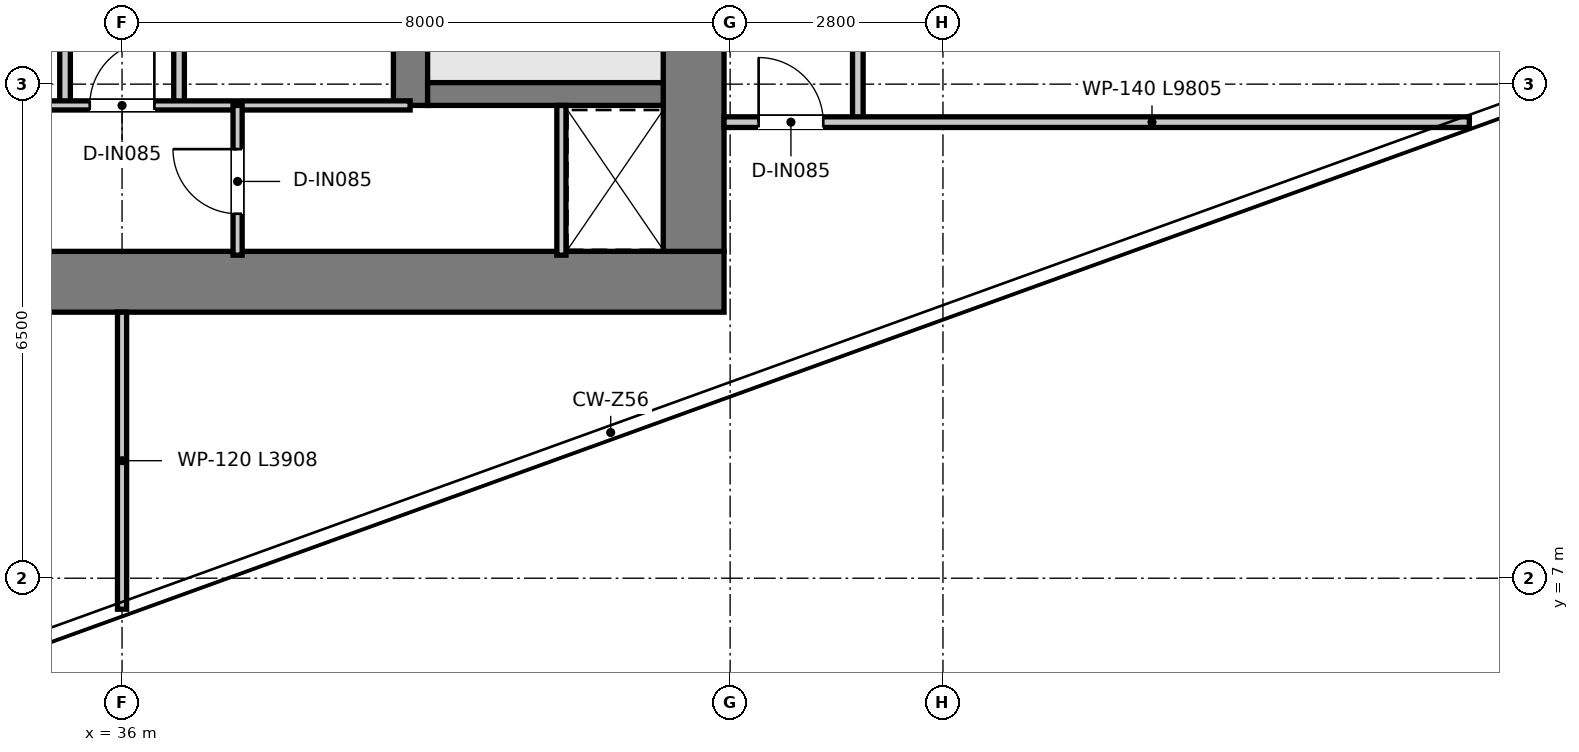
"""IFC4 building model, lengths in metres.
Left out: names, types, materials, properties, quantities, classifications, styles, units other than length and angle.
Written with IfcOpenShell. Run it as: python <this file> out.ifc"""

import sys

from ifc_helpers import new_model, si_unit, direction, frame, frame_2d, origin, place, context, subcontext, project, spatial, rectangle, extrude, element, fill, save


model = new_model("IFC4")
c1 = context("Model", 3, precision=1e-05, world=origin(), true_north=direction((0.0, 1.0)))
c2 = subcontext(c1, "Body", "Model", "MODEL_VIEW")
j1 = project(units=[si_unit("LENGTHUNIT", "METRE"), si_unit("PLANEANGLEUNIT", "RADIAN")], contexts=[c1])
p1 = place(None, origin())
s1 = spatial("IfcSite", under=j1, at=p1, CompositionType="ELEMENT")
p2 = place(p1, origin())
s2 = spatial("IfcBuilding", under=s1, at=p2, CompositionType="ELEMENT")
p3 = place(p2, frame((0.0, 0.0, 331.65)))
s3 = spatial("IfcBuildingStorey", under=s2, at=p3, CompositionType="ELEMENT", Elevation=331.65)
p4 = place(p3, frame((28.08, 10.9, 0.0), z_axis=(0.0, 0.0, 1.0), x_axis=(1.0, 0.0, 0.0)))
e1 = element("IfcWall", 1, at=p4, inside=s3, PredefinedType="SHEAR", context=c2, shape_type="SweptSolid", body=[
    extrude(rectangle(XDim=15.84, YDim=0.8, at=frame_2d((7.92, 0.0))), origin(), (0.0, 0.0, 1.0), 3.95),
])
p5 = place(p3, frame((43.52, 11.3, 0.0), z_axis=(0.0, 0.0, 1.0), x_axis=(0.0, 1.0, 0.0)))
e2 = element("IfcWall", 2, at=p5, inside=s3, PredefinedType="SHEAR", context=c2, shape_type="SweptSolid", body=[
    extrude(rectangle(XDim=14.7, YDim=0.8, at=frame_2d((7.35, 0.0))), origin(), (0.0, 0.0, 1.0), 3.95),
])
p6 = place(p3, frame((39.795, 13.22, 0.0), z_axis=(0.0, 0.0, 1.0), x_axis=(0.0, 1.0, 0.0)))
e3 = element("IfcWall", 3, at=p6, inside=s3, PredefinedType="SHEAR", context=c2, shape_type="SweptSolid", body=[
    extrude(rectangle(XDim=12.78, YDim=0.45, at=frame_2d((6.39, 0.0))), origin(), (0.0, 0.0, 1.0), 3.95),
])
p7 = place(p6, frame((10.58, 0.0, 0.0)))
e4 = element("IfcOpeningElement", 4, at=p7, cuts=e3, PredefinedType="OPENING", context=c2, shape_type="SweptSolid", body=[
    extrude(rectangle(XDim=1.1, YDim=2.15, at=frame_2d((0.55, 1.075))), frame((0.0, 0.235, 0.0), z_axis=(0.0, -1.0, 0.0), x_axis=(1.0, 0.0, 0.0)), (0.0, 0.0, 1.0), 0.47),
])
p8 = place(p3, frame((40.02, 13.37, 0.0), z_axis=(0.0, 0.0, 1.0), x_axis=(1.0, 0.0, 0.0)))
e5 = element("IfcWall", 5, at=p8, inside=s3, PredefinedType="SHEAR", context=c2, shape_type="SweptSolid", body=[
    extrude(rectangle(XDim=3.1, YDim=0.3, at=frame_2d((1.55, 0.0))), origin(), (0.0, 0.0, 1.0), 3.95),
])
p9 = place(p3, frame((54.966, 13.326, 0.0), z_axis=(0.0, 0.0, 1.0), x_axis=(-0.339961607222, 0.940439315222, 0.0)))
e6 = element("IfcWall", 6, at=p9, inside=s3, PredefinedType="ELEMENTEDWALL", context=c2, shape_type="SweptSolid", body=[
    extrude(rectangle(XDim=5.845, YDim=0.22, at=frame_2d((2.922, 0.0))), origin(), (0.0, 0.0, 1.0), 3.67),
])
p10 = place(p3, frame((35.25, 13.22, 0.0), z_axis=(0.0, 0.0, 1.0), x_axis=(0.0, 1.0, 0.0)))
e7 = element("IfcWall", 7, at=p10, inside=s3, PredefinedType="PARTITIONING", context=c2, shape_type="SweptSolid", body=[
    extrude(rectangle(XDim=4.56, YDim=0.14, at=frame_2d((2.28, 0.0))), origin(), (0.0, 0.0, 1.0), 3.67),
])
p11 = place(p10, frame((1.93, 0.0, 0.0)))
e8 = element("IfcOpeningElement", 8, at=p11, cuts=e7, PredefinedType="OPENING", context=c2, shape_type="SweptSolid", body=[
    extrude(rectangle(XDim=0.9, YDim=2.1, at=frame_2d((0.45, 1.05))), frame((0.0, 0.08, 0.0), z_axis=(0.0, -1.0, 0.0), x_axis=(1.0, 0.0, 0.0)), (0.0, 0.0, 1.0), 0.16),
])
p12 = place(p3, frame((36.75, 13.22, 0.0), z_axis=(0.0, 0.0, 1.0), x_axis=(0.0, 1.0, 0.0)))
e9 = element("IfcWall", 9, at=p12, inside=s3, PredefinedType="PARTITIONING", context=c2, shape_type="SweptSolid", body=[
    extrude(rectangle(XDim=4.56, YDim=0.14, at=frame_2d((2.28, 0.0))), origin(), (0.0, 0.0, 1.0), 3.67),
])
p13 = place(p12, frame((1.93, 0.0, 0.0)))
e10 = element("IfcOpeningElement", 10, at=p13, cuts=e9, PredefinedType="OPENING", context=c2, shape_type="SweptSolid", body=[
    extrude(rectangle(XDim=0.9, YDim=2.1, at=frame_2d((0.45, 1.05))), frame((0.0, 0.08, 0.0), z_axis=(0.0, -1.0, 0.0), x_axis=(1.0, 0.0, 0.0)), (0.0, 0.0, 1.0), 0.16),
])
p14 = place(p3, frame((41.78, 11.25, 0.0), z_axis=(0.0, 0.0, 1.0), x_axis=(0.0, 1.0, 0.0)))
e11 = element("IfcWall", 11, at=p14, inside=s3, PredefinedType="PARTITIONING", context=c2, shape_type="SweptSolid", body=[
    extrude(rectangle(XDim=1.97, YDim=0.12, at=frame_2d((0.985, 0.0))), origin(), (0.0, 0.0, 1.0), 3.67),
])
p15 = place(p3, frame((32.21, 13.22, 0.0), z_axis=(0.0, 0.0, 1.0), x_axis=(1.0, 0.0, 0.0)))
e12 = element("IfcWall", 12, at=p15, inside=s3, PredefinedType="PARTITIONING", context=c2, shape_type="SweptSolid", body=[
    extrude(rectangle(XDim=7.58, YDim=0.12, at=frame_2d((3.79, 0.0))), origin(), (0.0, 0.0, 1.0), 3.67),
])
p16 = place(p15, frame((3.365, 0.0, 0.0)))
e13 = element("IfcOpeningElement", 13, at=p16, cuts=e12, PredefinedType="OPENING", context=c2, shape_type="SweptSolid", body=[
    extrude(rectangle(XDim=0.85, YDim=2.1, at=frame_2d((0.425, 1.05))), frame((0.0, 0.07, 0.0), z_axis=(0.0, -1.0, 0.0), x_axis=(1.0, 0.0, 0.0)), (0.0, 0.0, 1.0), 0.14),
])
p17 = place(p3, frame((37.52, 11.25, 0.0), z_axis=(0.0, 0.0, 1.0), x_axis=(0.0, 1.0, 0.0)))
e14 = element("IfcWall", 14, at=p17, inside=s3, PredefinedType="PARTITIONING", context=c2, shape_type="SweptSolid", body=[
    extrude(rectangle(XDim=1.97, YDim=0.12, at=frame_2d((0.985, 0.0))), origin(), (0.0, 0.0, 1.0), 3.67),
])
p18 = place(p17, frame((0.545, 0.0, 0.0)))
e15 = element("IfcOpeningElement", 15, at=p18, cuts=e14, PredefinedType="OPENING", context=c2, shape_type="SweptSolid", body=[
    extrude(rectangle(XDim=0.85, YDim=2.1, at=frame_2d((0.425, 1.05))), frame((0.0, 0.07, 0.0), z_axis=(0.0, -1.0, 0.0), x_axis=(1.0, 0.0, 0.0)), (0.0, 0.0, 1.0), 0.14),
])
p19 = place(p3, frame((45.68, 13.0, 0.0), z_axis=(0.0, 0.0, 1.0), x_axis=(0.0, 1.0, 0.0)))
e16 = element("IfcWall", 16, at=p19, inside=s3, PredefinedType="PARTITIONING", context=c2, shape_type="SweptSolid", body=[
    extrude(rectangle(XDim=15.66, YDim=0.14, at=frame_2d((7.83, 0.0))), origin(), (0.0, 0.0, 1.0), 3.13),
])
p20 = place(p19, frame((14.3, 0.0, 0.0)))
e17 = element("IfcOpeningElement", 17, at=p20, cuts=e16, PredefinedType="OPENING", context=c2, shape_type="SweptSolid", body=[
    extrude(rectangle(XDim=0.9, YDim=2.1, at=frame_2d((0.45, 1.05))), frame((0.0, 0.08, 0.0), z_axis=(0.0, -1.0, 0.0), x_axis=(1.0, 0.0, 0.0)), (0.0, 0.0, 1.0), 0.16),
])
p21 = place(p19, frame((5.8, 0.0, 0.0)))
e18 = element("IfcOpeningElement", 18, at=p21, cuts=e16, PredefinedType="OPENING", context=c2, shape_type="SweptSolid", body=[
    extrude(rectangle(XDim=0.9, YDim=2.1, at=frame_2d((0.45, 1.05))), frame((0.0, 0.08, 0.0), z_axis=(0.0, -1.0, 0.0), x_axis=(1.0, 0.0, 0.0)), (0.0, 0.0, 1.0), 0.16),
])
p22 = place(p19, frame((10.46, 0.0, 0.0)))
e19 = element("IfcOpeningElement", 19, at=p22, cuts=e16, PredefinedType="OPENING", context=c2, shape_type="SweptSolid", body=[
    extrude(rectangle(XDim=0.9, YDim=2.1, at=frame_2d((0.45, 1.05))), frame((0.0, 0.08, 0.0), z_axis=(0.0, -1.0, 0.0), x_axis=(1.0, 0.0, 0.0)), (0.0, 0.0, 1.0), 0.16),
])
p23 = place(p3, frame((43.92, 13.0, 0.0), z_axis=(0.0, 0.0, 1.0), x_axis=(1.0, 0.0, 0.0)))
e20 = element("IfcWall", 20, at=p23, inside=s3, PredefinedType="PARTITIONING", context=c2, shape_type="SweptSolid", body=[
    extrude(rectangle(XDim=9.805, YDim=0.14, at=frame_2d((4.903, 0.0))), origin(), (0.0, 0.0, 1.0), 3.18),
])
p24 = place(p23, frame((0.455, 0.0, 0.0)))
e21 = element("IfcOpeningElement", 21, at=p24, cuts=e20, PredefinedType="OPENING", context=c2, shape_type="SweptSolid", body=[
    extrude(rectangle(XDim=0.85, YDim=2.1, at=frame_2d((0.425, 1.05))), frame((0.0, 0.08, 0.0), z_axis=(0.0, -1.0, 0.0), x_axis=(1.0, 0.0, 0.0)), (0.0, 0.0, 1.0), 0.16),
])
p25 = place(p3, frame((36.0, 6.592, 0.0), z_axis=(0.0, 0.0, 1.0), x_axis=(0.0, 1.0, 0.0)))
e22 = element("IfcWall", 22, at=p25, inside=s3, PredefinedType="PARTITIONING", context=c2, shape_type="SweptSolid", body=[
    extrude(rectangle(XDim=3.908, YDim=0.12, at=frame_2d((1.954, 0.0))), origin(), (0.0, 0.0, 1.0), 3.67),
])
p26 = place(p16, origin())
e23 = element("IfcDoor", 23, at=p26, inside=s3, OperationType="SINGLE_SWING_RIGHT", PredefinedType="DOOR", context=c2, shape_type="SweptSolid", body=[
    extrude(rectangle(XDim=0.85, YDim=2.1, at=frame_2d((0.425, 1.05))), frame((0.0, 0.025, 0.0), z_axis=(0.0, -1.0, 0.0), x_axis=(1.0, 0.0, 0.0)), (0.0, 0.0, 1.0), 0.05),
])
fill(e13, e23)
p27 = place(p18, origin())
e24 = element("IfcDoor", 24, at=p27, inside=s3, OperationType="SINGLE_SWING_RIGHT", PredefinedType="DOOR", context=c2, shape_type="SweptSolid", body=[
    extrude(rectangle(XDim=0.85, YDim=2.1, at=frame_2d((0.425, 1.05))), frame((0.0, 0.025, 0.0), z_axis=(0.0, -1.0, 0.0), x_axis=(1.0, 0.0, 0.0)), (0.0, 0.0, 1.0), 0.05),
])
fill(e15, e24)
p28 = place(p24, origin())
e25 = element("IfcDoor", 25, at=p28, inside=s3, OperationType="SINGLE_SWING_LEFT", PredefinedType="DOOR", context=c2, shape_type="SweptSolid", body=[
    extrude(rectangle(XDim=0.85, YDim=2.1, at=frame_2d((0.425, 1.05))), frame((0.0, 0.025, 0.0), z_axis=(0.0, -1.0, 0.0), x_axis=(1.0, 0.0, 0.0)), (0.0, 0.0, 1.0), 0.05),
])
fill(e21, e25)
save(model, sys.argv[1])
